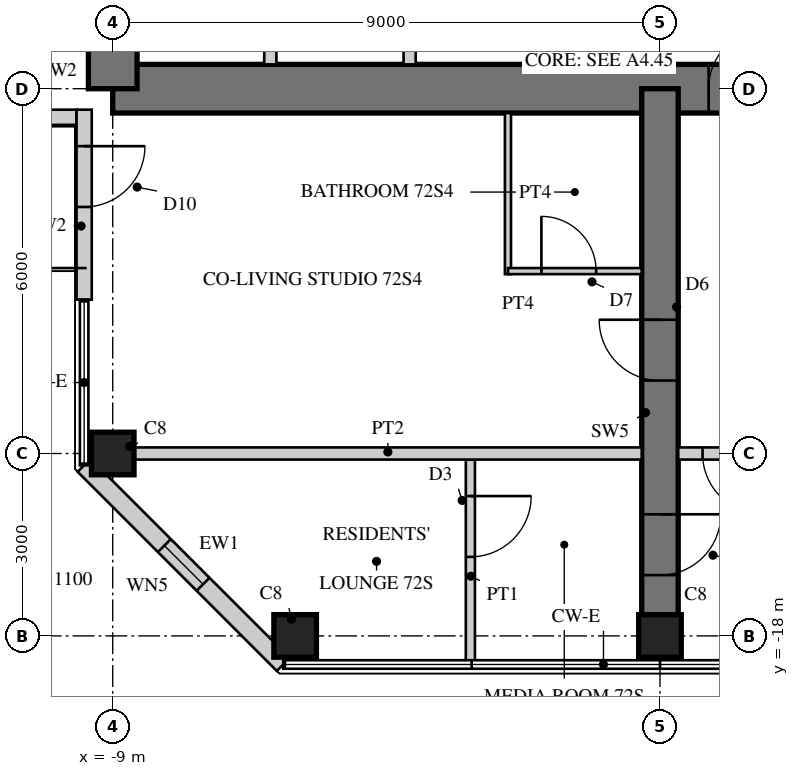
"""IFC4 building model, lengths in metres.
Left out: names, types, materials, properties, quantities, classifications, styles, units other than length and angle.
Written with IfcOpenShell. Run it as: python <this file> out.ifc"""

import sys

from ifc_helpers import new_model, si_unit, direction, frame, frame_2d, origin, origin_2d, place, context, subcontext, project, spatial, rectangle, hollow_rectangle, extrude, element, fill, save


model = new_model("IFC4")
c1 = context("Model", 3, precision=1e-05, world=origin(), true_north=direction((0.0, 1.0)))
c2 = subcontext(c1, "Body", "Model", "MODEL_VIEW")
j1 = project(units=[si_unit("LENGTHUNIT", "METRE"), si_unit("PLANEANGLEUNIT", "RADIAN")], contexts=[c1])
p1 = place(None, origin())
s1 = spatial("IfcSite", under=j1, at=p1, CompositionType="ELEMENT")
p2 = place(p1, origin())
s2 = spatial("IfcBuilding", under=s1, at=p2, CompositionType="ELEMENT")
p3 = place(p2, frame((0.0, 0.0, 278.1)))
s3 = spatial("IfcBuildingStorey", under=s2, at=p3, CompositionType="ELEMENT", Elevation=278.1)
p4 = place(p3, frame((-9.0, -9.0, 0.0), z_axis=(0.0, 0.0, 1.0), x_axis=(1.0, 0.0, 0.0)))
e1 = element("IfcWall", 1, at=p4, inside=s3, PredefinedType="SHEAR", context=c2, shape_type="SweptSolid", body=[
    extrude(rectangle(XDim=18.0, YDim=0.8, at=frame_2d((9.0, 0.0))), origin(), (0.0, 0.0, 1.0), 3.4),
])
p5 = place(p4, frame((9.8, 0.0, 0.0)))
e2 = element("IfcOpeningElement", 2, at=p5, cuts=e1, PredefinedType="OPENING", context=c2, shape_type="SweptSolid", body=[
    extrude(rectangle(XDim=1.0, YDim=2.4, at=frame_2d((0.5, 1.2))), frame((0.0, 0.41, 0.0), z_axis=(0.0, -1.0, 0.0), x_axis=(1.0, 0.0, 0.0)), (0.0, 0.0, 1.0), 0.82),
])
p6 = place(p3, frame((-9.0, 9.0, 0.0), z_axis=(0.0, 0.0, 1.0), x_axis=(0.0, -1.0, 0.0)))
e3 = element("IfcWall", 3, at=p6, inside=s3, PredefinedType="SHEAR", context=c2, shape_type="SweptSolid", body=[
    extrude(rectangle(XDim=18.0, YDim=0.8, at=frame_2d((9.0, 0.0))), origin(), (0.0, 0.0, 1.0), 3.4),
])
p7 = place(p6, frame((9.8, 0.0, 0.0)))
e4 = element("IfcOpeningElement", 4, at=p7, cuts=e3, PredefinedType="OPENING", context=c2, shape_type="SweptSolid", body=[
    extrude(rectangle(XDim=1.0, YDim=2.4, at=frame_2d((0.5, 1.2))), frame((0.0, 0.41, 0.0), z_axis=(0.0, -1.0, 0.0), x_axis=(1.0, 0.0, 0.0)), (0.0, 0.0, 1.0), 0.82),
])
p8 = place(p3, frame((-1.8, -1.875, 0.0), z_axis=(0.0, 0.0, 1.0), x_axis=(0.0, -1.0, 0.0)))
e5 = element("IfcWall", 5, at=p8, inside=s3, PredefinedType="SHEAR", context=c2, shape_type="SweptSolid", body=[
    extrude(rectangle(XDim=6.725, YDim=0.25, at=frame_2d((3.363, 0.0))), origin(), (0.0, 0.0, 1.0), 3.4),
])
p9 = place(p8, frame((1.875, 0.0, 0.0)))
e6 = element("IfcOpeningElement", 6, at=p9, cuts=e5, PredefinedType="OPENING", context=c2, shape_type="SweptSolid", body=[
    extrude(rectangle(XDim=1.6, YDim=2.4, at=frame_2d((0.8, 1.2))), frame((0.0, 0.135, 0.0), z_axis=(0.0, -1.0, 0.0), x_axis=(1.0, 0.0, 0.0)), (0.0, 0.0, 1.0), 0.27),
])
for number, where, z_axis, x_axis in (
    (7, (-4.117, -5.975, 0.0), (0.0, 0.0, 1.0), (0.0, -1.0, 0.0)),
    (8, (-6.408, -5.975, 0.0), (0.0, 0.0, 1.0), (0.0, -1.0, 0.0)),
):
    element("IfcWall", number, at=place(p3, frame(where, z_axis=z_axis, x_axis=x_axis)), inside=s3, PredefinedType="PARTITIONING", context=c2, shape_type="SweptSolid", body=[
        extrude(rectangle(XDim=2.625, YDim=0.2, at=frame_2d((1.312, 0.0))), origin(), (0.0, 0.0, 1.0), 3.4),
    ])
p10 = place(p3, frame((0.0, -9.0, 0.0), z_axis=(0.0, 0.0, 1.0), x_axis=(0.0, -1.0, 0.0)))
e9 = element("IfcWall", 9, at=p10, inside=s3, PredefinedType="SHEAR", context=c2, shape_type="SweptSolid", body=[
    extrude(rectangle(XDim=9.0, YDim=0.6, at=frame_2d((4.5, 0.0))), origin(), (0.0, 0.0, 1.0), 3.4),
])
p11 = place(p10, frame((3.8, 0.0, 0.0)))
e10 = element("IfcOpeningElement", 10, at=p11, cuts=e9, PredefinedType="OPENING", context=c2, shape_type="SweptSolid", body=[
    extrude(rectangle(XDim=1.0, YDim=2.15, at=frame_2d((0.5, 1.075))), frame((0.0, 0.31, 0.0), z_axis=(0.0, -1.0, 0.0), x_axis=(1.0, 0.0, 0.0)), (0.0, 0.0, 1.0), 0.62),
])
p12 = place(p10, frame((7.0, 0.0, 0.0)))
e11 = element("IfcOpeningElement", 11, at=p12, cuts=e9, PredefinedType="OPENING", context=c2, shape_type="SweptSolid", body=[
    extrude(rectangle(XDim=1.0, YDim=2.2, at=frame_2d((0.5, 1.1))), frame((0.0, 0.31, 0.0), z_axis=(0.0, -1.0, 0.0), x_axis=(1.0, 0.0, 0.0)), (0.0, 0.0, 1.0), 0.62),
])
for number, where, z_axis, x_axis in (
    (12, (-9.0, -15.0, 0.0), (0.0, 0.0, 1.0), (1.0, 0.0, 0.0)),
    (13, (-6.0, -18.0, 0.0), (0.0, 0.0, 1.0), (1.0, 0.0, 0.0)),
    (14, (0.0, -18.0, 0.0), (0.0, 0.0, 1.0), (1.0, 0.0, 0.0)),
):
    element("IfcColumn", number, at=place(p3, frame(where, z_axis=z_axis, x_axis=x_axis)), inside=s3, PredefinedType="COLUMN", context=c2, shape_type="SweptSolid", body=[
        extrude(rectangle(XDim=0.7, YDim=0.7, at=origin_2d()), origin(), (0.0, 0.0, 1.0), 3.4),
    ])
p13 = place(p3, frame((-12.47, -9.47, 0.0), z_axis=(0.0, 0.0, 1.0), x_axis=(1.0, 0.0, 0.0)))
e15 = element("IfcWall", 15, at=p13, inside=s3, PredefinedType="SOLIDWALL", context=c2, shape_type="SweptSolid", body=[
    extrude(rectangle(XDim=2.875, YDim=0.25, at=frame_2d((1.438, 0.0))), origin(), (0.0, 0.0, 1.0), 3.22),
])
p14 = place(p13, frame((0.6, 0.0, 0.0)))
e16 = element("IfcOpeningElement", 16, at=p14, cuts=e15, PredefinedType="OPENING", context=c2, shape_type="SweptSolid", body=[
    extrude(rectangle(XDim=1.0, YDim=2.2, at=frame_2d((0.5, 1.1))), frame((0.0, 0.135, 0.0), z_axis=(0.0, -1.0, 0.0), x_axis=(1.0, 0.0, 0.0)), (0.0, 0.0, 1.0), 0.27),
])
p15 = place(p3, frame((-9.47, -9.345, 0.0), z_axis=(0.0, 0.0, 1.0), x_axis=(0.0, -1.0, 0.0)))
e17 = element("IfcWall", 17, at=p15, inside=s3, PredefinedType="SOLIDWALL", context=c2, shape_type="SweptSolid", body=[
    extrude(rectangle(XDim=3.125, YDim=0.25, at=frame_2d((1.562, 0.0))), origin(), (0.0, 0.0, 1.0), 3.22),
])
p16 = place(p15, frame((0.6, 0.0, 0.0)))
e18 = element("IfcOpeningElement", 18, at=p16, cuts=e17, PredefinedType="OPENING", context=c2, shape_type="SweptSolid", body=[
    extrude(rectangle(XDim=1.0, YDim=2.2, at=frame_2d((0.5, 1.1))), frame((0.0, 0.135, 0.0), z_axis=(0.0, -1.0, 0.0), x_axis=(1.0, 0.0, 0.0)), (0.0, 0.0, 1.0), 0.27),
])
p17 = place(p3, frame((-9.47, -15.195, 0.0), z_axis=(0.0, 0.0, 1.0), x_axis=(0.707106781187, -0.707106781187, 0.0)))
e19 = element("IfcWall", 19, at=p17, inside=s3, PredefinedType="SOLIDWALL", context=c2, shape_type="SweptSolid", body=[
    extrude(rectangle(XDim=4.632, YDim=0.3, at=frame_2d((2.316, 0.0))), origin(), (0.0, 0.0, 1.0), 3.22),
])
p18 = place(p17, frame((1.866, 0.0, 0.3)))
e20 = element("IfcOpeningElement", 20, at=p18, cuts=e19, PredefinedType="OPENING", context=c2, shape_type="SweptSolid", body=[
    extrude(rectangle(XDim=0.9, YDim=2.4, at=frame_2d((0.45, 1.2))), frame((0.0, 0.16, 0.0), z_axis=(0.0, -1.0, 0.0), x_axis=(1.0, 0.0, 0.0)), (0.0, 0.0, 1.0), 0.32),
])
p19 = place(p3, frame((-2.5, -9.4, 0.0), z_axis=(0.0, 0.0, 1.0), x_axis=(0.0, -1.0, 0.0)))
e21 = element("IfcWall", 21, at=p19, inside=s3, PredefinedType="PARTITIONING", context=c2, shape_type="SweptSolid", body=[
    extrude(rectangle(XDim=2.65, YDim=0.1, at=frame_2d((1.325, 0.0))), origin(), (0.0, 0.0, 1.0), 3.22),
])
p20 = place(p3, frame((-2.5, -12.0, 0.0), z_axis=(0.0, 0.0, 1.0), x_axis=(1.0, 0.0, 0.0)))
e22 = element("IfcWall", 22, at=p20, inside=s3, PredefinedType="PARTITIONING", context=c2, shape_type="SweptSolid", body=[
    extrude(rectangle(XDim=2.2, YDim=0.1, at=frame_2d((1.1, 0.0))), origin(), (0.0, 0.0, 1.0), 3.22),
])
p21 = place(p20, frame((0.55, 0.0, 0.0)))
e23 = element("IfcOpeningElement", 23, at=p21, cuts=e22, PredefinedType="OPENING", context=c2, shape_type="SweptSolid", body=[
    extrude(rectangle(XDim=0.9, YDim=2.1, at=frame_2d((0.45, 1.05))), frame((0.0, 0.06, 0.0), z_axis=(0.0, -1.0, 0.0), x_axis=(1.0, 0.0, 0.0)), (0.0, 0.0, 1.0), 0.12),
])
p22 = place(p3, frame((-3.118, -15.1, 0.0), z_axis=(0.0, 0.0, 1.0), x_axis=(0.0, -1.0, 0.0)))
e24 = element("IfcWall", 24, at=p22, inside=s3, PredefinedType="PARTITIONING", context=c2, shape_type="SweptSolid", body=[
    extrude(rectangle(XDim=3.33, YDim=0.15, at=frame_2d((1.665, 0.0))), origin(), (0.0, 0.0, 1.0), 3.22),
])
p23 = place(p22, frame((0.6, 0.0, 0.0)))
e25 = element("IfcOpeningElement", 25, at=p23, cuts=e24, PredefinedType="OPENING", context=c2, shape_type="SweptSolid", body=[
    extrude(rectangle(XDim=1.0, YDim=2.1, at=frame_2d((0.5, 1.05))), frame((0.0, 0.085, 0.0), z_axis=(0.0, -1.0, 0.0), x_axis=(1.0, 0.0, 0.0)), (0.0, 0.0, 1.0), 0.17),
])
p24 = place(p3, frame((-8.65, -15.0, 0.0), z_axis=(0.0, 0.0, 1.0), x_axis=(1.0, 0.0, 0.0)))
e26 = element("IfcWall", 26, at=p24, inside=s3, PredefinedType="SOLIDWALL", context=c2, shape_type="SweptSolid", body=[
    extrude(rectangle(XDim=8.35, YDim=0.2, at=frame_2d((4.175, 0.0))), origin(), (0.0, 0.0, 1.0), 2.52),
])
p25 = place(p3, frame((0.3, -15.0, 0.0), z_axis=(0.0, 0.0, 1.0), x_axis=(1.0, 0.0, 0.0)))
e27 = element("IfcWall", 27, at=p25, inside=s3, PredefinedType="SOLIDWALL", context=c2, shape_type="SweptSolid", body=[
    extrude(rectangle(XDim=8.35, YDim=0.2, at=frame_2d((4.175, 0.0))), origin(), (0.0, 0.0, 1.0), 2.52),
])
p26 = place(p25, frame((0.4, 0.0, 0.0)))
e28 = element("IfcOpeningElement", 28, at=p26, cuts=e27, PredefinedType="OPENING", context=c2, shape_type="SweptSolid", body=[
    extrude(rectangle(XDim=1.0, YDim=2.2, at=frame_2d((0.5, 1.1))), frame((0.0, 0.11, 0.0), z_axis=(0.0, -1.0, 0.0), x_axis=(1.0, 0.0, 0.0)), (0.0, 0.0, 1.0), 0.22),
])
p27 = place(p16, origin())
e29 = element("IfcDoor", 29, at=p27, inside=s3, OperationType="SINGLE_SWING_LEFT", PredefinedType="DOOR", context=c2, shape_type="SweptSolid", body=[
    extrude(hollow_rectangle(XDim=1.0, YDim=2.2, WallThickness=0.06, at=frame_2d((0.5, 1.1))), frame((0.0, 0.025, 0.0), z_axis=(0.0, -1.0, 0.0), x_axis=(1.0, 0.0, 0.0)), (0.0, 0.0, 1.0), 0.05),
    extrude(rectangle(XDim=0.879, YDim=2.079, at=frame_2d((0.5, 1.1))), frame((0.0, 0.025, 0.0), z_axis=(0.0, -1.0, 0.0), x_axis=(1.0, 0.0, 0.0)), (0.0, 0.0, 1.0), 0.05),
])
fill(e18, e29)
p28 = place(p18, origin())
e30 = element("IfcWindow", 30, at=p28, inside=s3, PartitioningType="SINGLE_PANEL", PredefinedType="WINDOW", context=c2, shape_type="SweptSolid", body=[
    extrude(hollow_rectangle(XDim=0.9, YDim=2.4, WallThickness=0.06, at=frame_2d((0.45, 1.2))), frame((0.0, 0.03, 0.0), z_axis=(0.0, -1.0, 0.0), x_axis=(1.0, 0.0, 0.0)), (0.0, 0.0, 1.0), 0.06),
    extrude(rectangle(XDim=0.779, YDim=2.279, at=frame_2d((0.45, 1.2))), frame((0.0, 0.03, 0.0), z_axis=(0.0, -1.0, 0.0), x_axis=(1.0, 0.0, 0.0)), (0.0, 0.0, 1.0), 0.06),
])
fill(e20, e30)
p29 = place(p21, origin())
e31 = element("IfcDoor", 31, at=p29, inside=s3, OperationType="SINGLE_SWING_LEFT", PredefinedType="DOOR", context=c2, shape_type="SweptSolid", body=[
    extrude(rectangle(XDim=0.9, YDim=2.1, at=frame_2d((0.45, 1.05))), frame((0.0, 0.025, 0.0), z_axis=(0.0, -1.0, 0.0), x_axis=(1.0, 0.0, 0.0)), (0.0, 0.0, 1.0), 0.05),
])
fill(e23, e31)
p30 = place(p23, origin())
e32 = element("IfcDoor", 32, at=p30, inside=s3, OperationType="SINGLE_SWING_LEFT", PredefinedType="DOOR", context=c2, shape_type="SweptSolid", body=[
    extrude(rectangle(XDim=1.0, YDim=2.1, at=frame_2d((0.5, 1.05))), frame((0.0, 0.025, 0.0), z_axis=(0.0, -1.0, 0.0), x_axis=(1.0, 0.0, 0.0)), (0.0, 0.0, 1.0), 0.05),
])
fill(e25, e32)
p31 = place(p26, frame((1.0, 0.0, 0.0), z_axis=(0.0, 0.0, 1.0), x_axis=(-1.0, 0.0, 0.0)))
e33 = element("IfcDoor", 33, at=p31, inside=s3, OperationType="SINGLE_SWING_LEFT", PredefinedType="DOOR", context=c2, shape_type="SweptSolid", body=[
    extrude(rectangle(XDim=1.0, YDim=2.2, at=frame_2d((0.5, 1.1))), frame((0.0, 0.025, 0.0), z_axis=(0.0, -1.0, 0.0), x_axis=(1.0, 0.0, 0.0)), (0.0, 0.0, 1.0), 0.05),
])
fill(e28, e33)
p32 = place(p11, frame((1.0, 0.0, 0.0), z_axis=(0.0, 0.0, 1.0), x_axis=(-1.0, 0.0, 0.0)))
e34 = element("IfcDoor", 34, at=p32, inside=s3, OperationType="SINGLE_SWING_RIGHT", PredefinedType="DOOR", context=c2, shape_type="SweptSolid", body=[
    extrude(rectangle(XDim=1.0, YDim=2.15, at=frame_2d((0.5, 1.075))), frame((0.0, 0.025, 0.0), z_axis=(0.0, -1.0, 0.0), x_axis=(1.0, 0.0, 0.0)), (0.0, 0.0, 1.0), 0.05),
])
fill(e10, e34)
p33 = place(p12, origin())
e35 = element("IfcDoor", 35, at=p33, inside=s3, OperationType="SINGLE_SWING_LEFT", PredefinedType="DOOR", context=c2, shape_type="SweptSolid", body=[
    extrude(rectangle(XDim=1.0, YDim=2.2, at=frame_2d((0.5, 1.1))), frame((0.0, 0.025, 0.0), z_axis=(0.0, -1.0, 0.0), x_axis=(1.0, 0.0, 0.0)), (0.0, 0.0, 1.0), 0.05),
])
fill(e11, e35)
p34 = place(p5, origin())
e36 = element("IfcDoor", 36, at=p34, inside=s3, OperationType="SINGLE_SWING_RIGHT", PredefinedType="DOOR", context=c2, shape_type="SweptSolid", body=[
    extrude(rectangle(XDim=1.0, YDim=2.4, at=frame_2d((0.5, 1.2))), frame((0.0, 0.055, 0.0), z_axis=(0.0, -1.0, 0.0), x_axis=(1.0, 0.0, 0.0)), (0.0, 0.0, 1.0), 0.05),
])
fill(e2, e36)
save(model, sys.argv[1])
